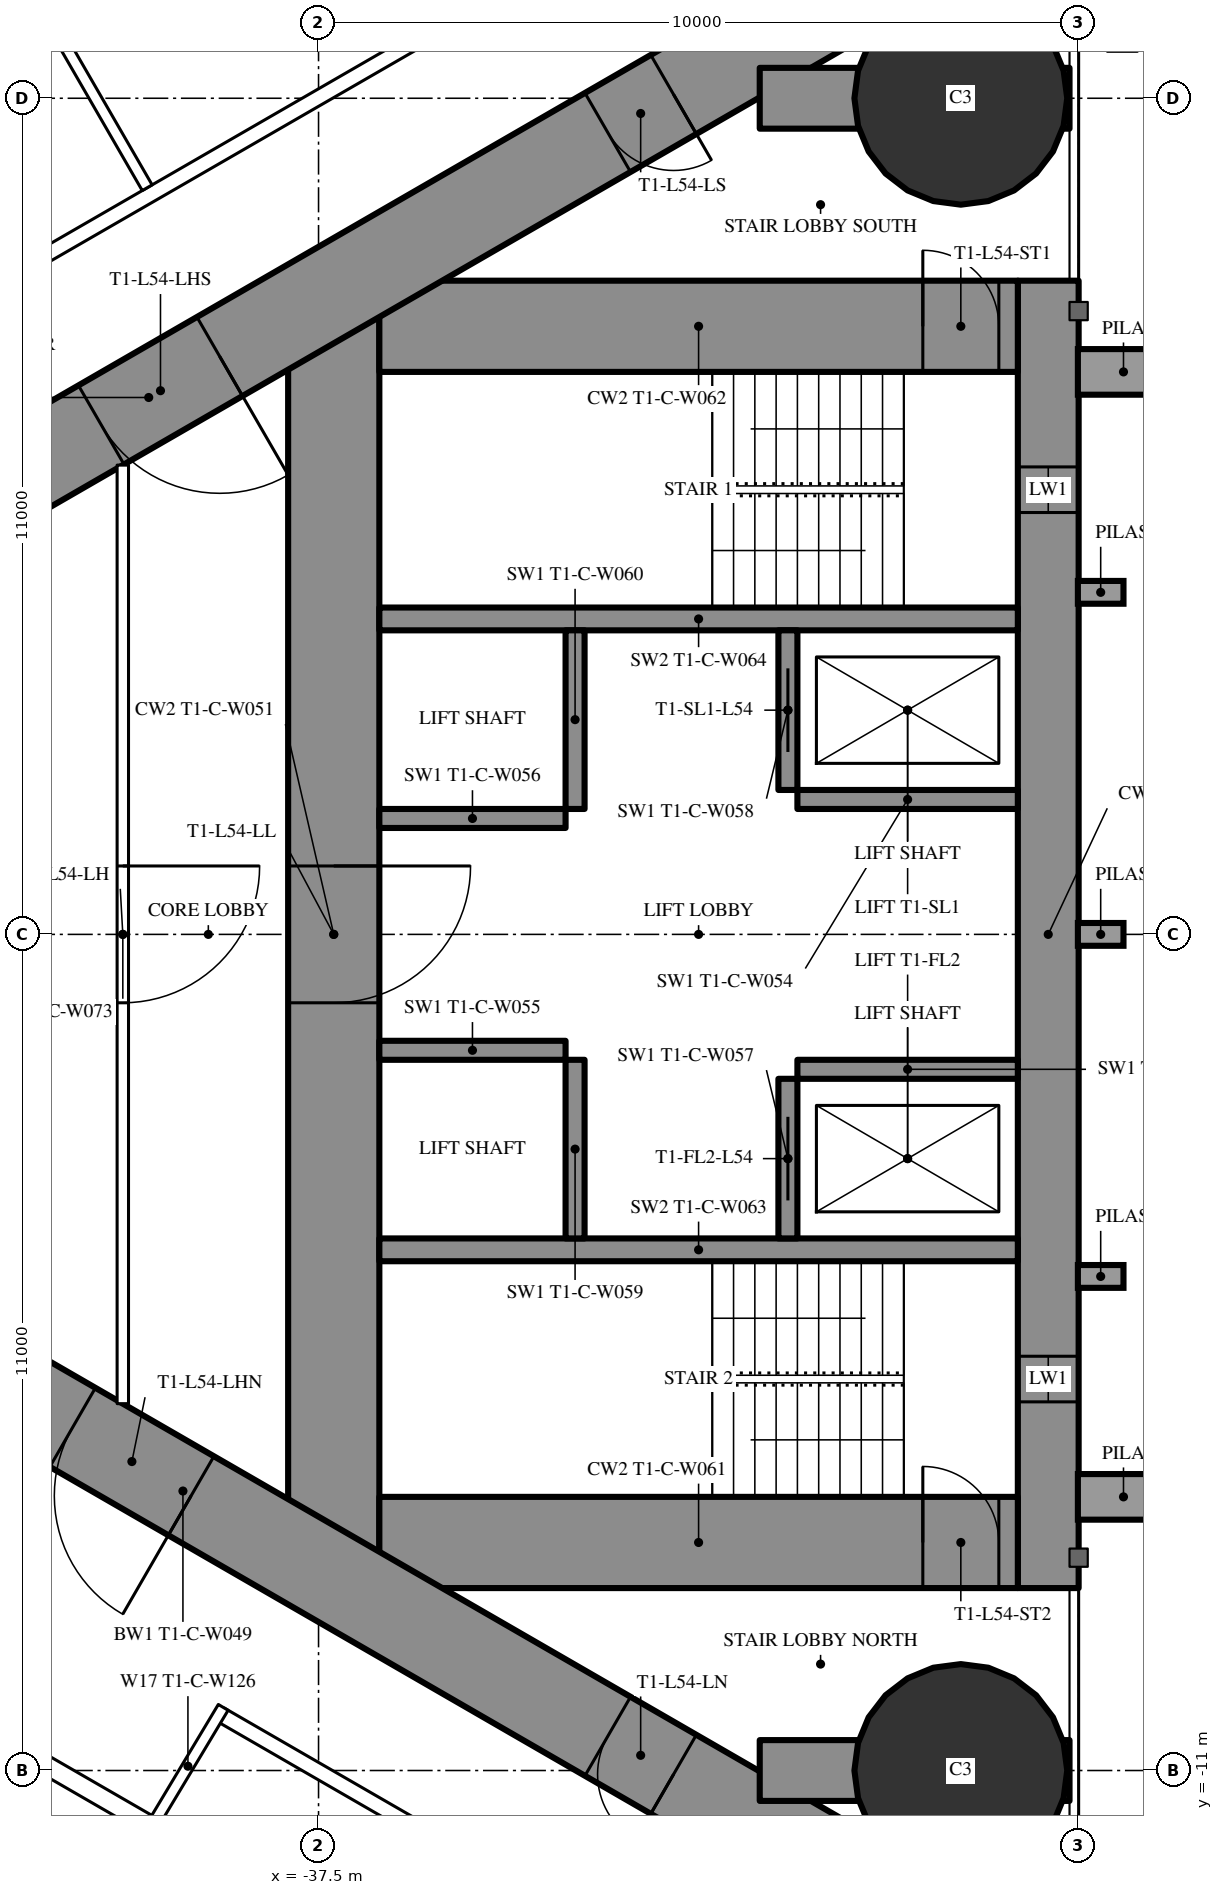
"""IFC4 building model, lengths in metres.
Left out: names, types, materials, properties, quantities, classifications, styles, units other than length and angle.
Written with IfcOpenShell. Run it as: python <this file> out.ifc"""

import sys

from ifc_helpers import new_model, si_unit, direction, frame, frame_2d, origin, origin_2d, place, context, subcontext, project, spatial, rectangle, circle, extrude, element, fill, save


model = new_model("IFC4")
c1 = context("Model", 3, precision=1e-05, world=origin(), true_north=direction((0.0, 1.0)))
c2 = subcontext(c1, "Body", "Model", "MODEL_VIEW")
j1 = project(units=[si_unit("LENGTHUNIT", "METRE"), si_unit("PLANEANGLEUNIT", "RADIAN")], contexts=[c1])
p1 = place(None, origin())
s1 = spatial("IfcSite", under=j1, at=p1, CompositionType="ELEMENT")
p2 = place(p1, origin())
s2 = spatial("IfcBuilding", under=s1, at=p2, CompositionType="ELEMENT")
p3 = place(p2, frame((0.0, 0.0, 201.8)))
s3 = spatial("IfcBuildingStorey", under=s2, at=p3, CompositionType="ELEMENT", Elevation=201.8)
for number, where, z_axis, x_axis in (
    (1, (-29.05, -11.0, 0.0), (0.0, 0.0, 1.0), (1.0, 0.0, 0.0)),
    (2, (-29.05, 11.0, 0.0), (0.0, 0.0, 1.0), (1.0, 0.0, 0.0)),
):
    element("IfcColumn", number, at=place(p3, frame(where, z_axis=z_axis, x_axis=x_axis)), inside=s3, PredefinedType="COLUMN", context=c2, shape_type="SweptSolid", body=[
        extrude(circle(Radius=1.4, at=origin_2d()), origin(), (0.0, 0.0, 1.0), 3.5),
    ])
p4 = place(p3, frame((-27.9, 8.6, 0.0), z_axis=(0.0, 0.0, 1.0), x_axis=(0.0, -1.0, 0.0)))
e3 = element("IfcWall", 3, at=p4, inside=s3, PredefinedType="SHEAR", context=c2, shape_type="SweptSolid", body=[
    extrude(rectangle(XDim=17.2, YDim=0.8, at=frame_2d((8.6, 0.0))), origin(), (0.0, 0.0, 1.0), 3.5),
])
p5 = place(p4, frame((2.45, 0.0, 0.6)))
e4 = element("IfcOpeningElement", 4, at=p5, cuts=e3, PredefinedType="OPENING", context=c2, shape_type="SweptSolid", body=[
    extrude(rectangle(XDim=0.6, YDim=2.1, at=frame_2d((0.3, 1.05))), frame((0.0, 0.41, 0.0), z_axis=(0.0, -1.0, 0.0), x_axis=(1.0, 0.0, 0.0)), (0.0, 0.0, 1.0), 0.82),
])
p6 = place(p4, frame((14.15, 0.0, 0.6)))
e5 = element("IfcOpeningElement", 5, at=p6, cuts=e3, PredefinedType="OPENING", context=c2, shape_type="SweptSolid", body=[
    extrude(rectangle(XDim=0.6, YDim=2.1, at=frame_2d((0.3, 1.05))), frame((0.0, 0.41, 0.0), z_axis=(0.0, -1.0, 0.0), x_axis=(1.0, 0.0, 0.0)), (0.0, 0.0, 1.0), 0.82),
])
p7 = place(p3, frame((-37.3, 8.6, 0.0), z_axis=(0.0, 0.0, 1.0), x_axis=(0.0, -1.0, 0.0)))
e6 = element("IfcWall", 6, at=p7, inside=s3, PredefinedType="SHEAR", context=c2, shape_type="SweptSolid", body=[
    extrude(rectangle(XDim=17.2, YDim=1.2, at=frame_2d((8.6, 0.0))), origin(), (0.0, 0.0, 1.0), 3.5),
])
p8 = place(p7, frame((7.7, 0.0, 0.0)))
e7 = element("IfcOpeningElement", 7, at=p8, cuts=e6, PredefinedType="OPENING", context=c2, shape_type="SweptSolid", body=[
    extrude(rectangle(XDim=1.8, YDim=2.2, at=frame_2d((0.9, 1.1))), frame((0.0, 0.61, 0.0), z_axis=(0.0, -1.0, 0.0), x_axis=(1.0, 0.0, 0.0)), (0.0, 0.0, 1.0), 1.22),
])
p9 = place(p3, frame((-28.3, 8.0, 0.0), z_axis=(0.0, 0.0, 1.0), x_axis=(-1.0, 0.0, 0.0)))
e8 = element("IfcWall", 8, at=p9, inside=s3, PredefinedType="SHEAR", context=c2, shape_type="SweptSolid", body=[
    extrude(rectangle(XDim=8.4, YDim=1.2, at=frame_2d((4.2, 0.0))), origin(), (0.0, 0.0, 1.0), 3.5),
])
p10 = place(p9, frame((0.25, 0.0, 0.0)))
e9 = element("IfcOpeningElement", 9, at=p10, cuts=e8, PredefinedType="OPENING", context=c2, shape_type="SweptSolid", body=[
    extrude(rectangle(XDim=1.0, YDim=2.2, at=frame_2d((0.5, 1.1))), frame((0.0, 0.61, 0.0), z_axis=(0.0, -1.0, 0.0), x_axis=(1.0, 0.0, 0.0)), (0.0, 0.0, 1.0), 1.22),
])
p11 = place(p3, frame((-28.3, -8.0, 0.0), z_axis=(0.0, 0.0, 1.0), x_axis=(-1.0, 0.0, 0.0)))
e10 = element("IfcWall", 10, at=p11, inside=s3, PredefinedType="SHEAR", context=c2, shape_type="SweptSolid", body=[
    extrude(rectangle(XDim=8.4, YDim=1.2, at=frame_2d((4.2, 0.0))), origin(), (0.0, 0.0, 1.0), 3.5),
])
p12 = place(p11, frame((0.25, 0.0, 0.0)))
e11 = element("IfcOpeningElement", 11, at=p12, cuts=e10, PredefinedType="OPENING", context=c2, shape_type="SweptSolid", body=[
    extrude(rectangle(XDim=1.0, YDim=2.2, at=frame_2d((0.5, 1.1))), frame((0.0, 0.61, 0.0), z_axis=(0.0, -1.0, 0.0), x_axis=(1.0, 0.0, 0.0)), (0.0, 0.0, 1.0), 1.22),
])
for number, where, z_axis, x_axis in (
    (12, (-28.3, 4.15, 0.0), (0.0, 0.0, 1.0), (-1.0, 0.0, 0.0)),
    (13, (-28.3, -4.15, 0.0), (0.0, 0.0, 1.0), (-1.0, 0.0, 0.0)),
):
    element("IfcWall", number, at=place(p3, frame(where, z_axis=z_axis, x_axis=x_axis)), inside=s3, PredefinedType="SHEAR", context=c2, shape_type="SweptSolid", body=[
        extrude(rectangle(XDim=8.4, YDim=0.3, at=frame_2d((4.2, 0.0))), origin(), (0.0, 0.0, 1.0), 3.5),
    ])
p13 = place(p3, frame((-31.325, 4.0, 0.0), z_axis=(0.0, 0.0, 1.0), x_axis=(0.0, -1.0, 0.0)))
e14 = element("IfcWall", 14, at=p13, inside=s3, PredefinedType="SHEAR", context=c2, shape_type="SweptSolid", body=[
    extrude(rectangle(XDim=2.1, YDim=0.25, at=frame_2d((1.05, 0.0))), origin(), (0.0, 0.0, 1.0), 3.5),
])
p14 = place(p13, frame((0.5, 0.0, 0.0)))
e15 = element("IfcOpeningElement", 15, at=p14, cuts=e14, PredefinedType="OPENING", context=c2, shape_type="SweptSolid", body=[
    extrude(rectangle(XDim=1.1, YDim=2.2, at=frame_2d((0.55, 1.1))), frame((0.0, 0.135, 0.0), z_axis=(0.0, -1.0, 0.0), x_axis=(1.0, 0.0, 0.0)), (0.0, 0.0, 1.0), 0.27),
])
p15 = place(p3, frame((-34.125, 4.0, 0.0), z_axis=(0.0, 0.0, 1.0), x_axis=(0.0, -1.0, 0.0)))
e16 = element("IfcWall", 16, at=p15, inside=s3, PredefinedType="SHEAR", context=c2, shape_type="SweptSolid", body=[
    extrude(rectangle(XDim=2.35, YDim=0.25, at=frame_2d((1.175, 0.0))), origin(), (0.0, 0.0, 1.0), 3.5),
])
p16 = place(p3, frame((-28.3, 1.775, 0.0), z_axis=(0.0, 0.0, 1.0), x_axis=(-1.0, 0.0, 0.0)))
e17 = element("IfcWall", 17, at=p16, inside=s3, PredefinedType="SHEAR", context=c2, shape_type="SweptSolid", body=[
    extrude(rectangle(XDim=2.9, YDim=0.25, at=frame_2d((1.45, 0.0))), origin(), (0.0, 0.0, 1.0), 3.5),
])
p17 = place(p3, frame((-34.25, 1.525, 0.0), z_axis=(0.0, 0.0, 1.0), x_axis=(-1.0, 0.0, 0.0)))
e18 = element("IfcWall", 18, at=p17, inside=s3, PredefinedType="SHEAR", context=c2, shape_type="SweptSolid", body=[
    extrude(rectangle(XDim=2.45, YDim=0.25, at=frame_2d((1.225, 0.0))), origin(), (0.0, 0.0, 1.0), 3.5),
])
p18 = place(p3, frame((-31.325, -1.9, 0.0), z_axis=(0.0, 0.0, 1.0), x_axis=(0.0, -1.0, 0.0)))
e19 = element("IfcWall", 19, at=p18, inside=s3, PredefinedType="SHEAR", context=c2, shape_type="SweptSolid", body=[
    extrude(rectangle(XDim=2.1, YDim=0.25, at=frame_2d((1.05, 0.0))), origin(), (0.0, 0.0, 1.0), 3.5),
])
p19 = place(p18, frame((0.5, 0.0, 0.0)))
e20 = element("IfcOpeningElement", 20, at=p19, cuts=e19, PredefinedType="OPENING", context=c2, shape_type="SweptSolid", body=[
    extrude(rectangle(XDim=1.1, YDim=2.2, at=frame_2d((0.55, 1.1))), frame((0.0, 0.135, 0.0), z_axis=(0.0, -1.0, 0.0), x_axis=(1.0, 0.0, 0.0)), (0.0, 0.0, 1.0), 0.27),
])
p20 = place(p3, frame((-34.125, -1.65, 0.0), z_axis=(0.0, 0.0, 1.0), x_axis=(0.0, -1.0, 0.0)))
e21 = element("IfcWall", 21, at=p20, inside=s3, PredefinedType="SHEAR", context=c2, shape_type="SweptSolid", body=[
    extrude(rectangle(XDim=2.35, YDim=0.25, at=frame_2d((1.175, 0.0))), origin(), (0.0, 0.0, 1.0), 3.5),
])
p21 = place(p3, frame((-28.3, -1.775, 0.0), z_axis=(0.0, 0.0, 1.0), x_axis=(-1.0, 0.0, 0.0)))
e22 = element("IfcWall", 22, at=p21, inside=s3, PredefinedType="SHEAR", context=c2, shape_type="SweptSolid", body=[
    extrude(rectangle(XDim=2.9, YDim=0.25, at=frame_2d((1.45, 0.0))), origin(), (0.0, 0.0, 1.0), 3.5),
])
p22 = place(p3, frame((-34.25, -1.525, 0.0), z_axis=(0.0, 0.0, 1.0), x_axis=(-1.0, 0.0, 0.0)))
e23 = element("IfcWall", 23, at=p22, inside=s3, PredefinedType="SHEAR", context=c2, shape_type="SweptSolid", body=[
    extrude(rectangle(XDim=2.45, YDim=0.25, at=frame_2d((1.225, 0.0))), origin(), (0.0, 0.0, 1.0), 3.5),
])
p23 = place(p3, frame((-27.2, 14.3, 0.0), z_axis=(0.0, 0.0, 1.0), x_axis=(-0.866026593062, -0.499997940104, 0.0)))
e24 = element("IfcWall", 24, at=p23, inside=s3, PredefinedType="SHEAR", context=c2, shape_type="SweptSolid", body=[
    extrude(rectangle(XDim=28.946, YDim=1.2, at=frame_2d((14.473, 0.0))), origin(), (0.0, 0.0, 1.0), 3.5),
])
p24 = place(p23, frame((6.5, 0.0, 0.0)))
e25 = element("IfcOpeningElement", 25, at=p24, cuts=e24, PredefinedType="OPENING", context=c2, shape_type="SweptSolid", body=[
    extrude(rectangle(XDim=1.0, YDim=2.2, at=frame_2d((0.5, 1.1))), frame((0.0, 0.61, 0.0), z_axis=(0.0, -1.0, 0.0), x_axis=(1.0, 0.0, 0.0)), (0.0, 0.0, 1.0), 1.22),
])
p25 = place(p23, frame((13.395, 0.0, 0.0)))
e26 = element("IfcOpeningElement", 26, at=p25, cuts=e24, PredefinedType="OPENING", context=c2, shape_type="SweptSolid", body=[
    extrude(rectangle(XDim=1.8, YDim=2.03, at=frame_2d((0.9, 1.015))), frame((0.0, 0.61, 0.0), z_axis=(0.0, -1.0, 0.0), x_axis=(1.0, 0.0, 0.0)), (0.0, 0.0, 1.0), 1.22),
])
p26 = place(p3, frame((-27.2, -14.3, 0.0), z_axis=(0.0, 0.0, 1.0), x_axis=(-0.866024021859, 0.500002393557, 0.0)))
e27 = element("IfcWall", 27, at=p26, inside=s3, PredefinedType="SHEAR", context=c2, shape_type="SweptSolid", body=[
    extrude(rectangle(XDim=27.907, YDim=1.2, at=frame_2d((13.954, 0.0))), origin(), (0.0, 0.0, 1.0), 3.5),
])
p27 = place(p26, frame((6.5, 0.0, 0.0)))
e28 = element("IfcOpeningElement", 28, at=p27, cuts=e27, PredefinedType="OPENING", context=c2, shape_type="SweptSolid", body=[
    extrude(rectangle(XDim=1.0, YDim=2.2, at=frame_2d((0.5, 1.1))), frame((0.0, 0.61, 0.0), z_axis=(0.0, -1.0, 0.0), x_axis=(1.0, 0.0, 0.0)), (0.0, 0.0, 1.0), 1.22),
])
p28 = place(p26, frame((13.829, 0.0, 0.0)))
e29 = element("IfcOpeningElement", 29, at=p28, cuts=e27, PredefinedType="OPENING", context=c2, shape_type="SweptSolid", body=[
    extrude(rectangle(XDim=1.8, YDim=2.2, at=frame_2d((0.9, 1.1))), frame((0.0, 0.61, 0.0), z_axis=(0.0, -1.0, 0.0), x_axis=(1.0, 0.0, 0.0)), (0.0, 0.0, 1.0), 1.22),
])
for number, where, z_axis, x_axis in (
    (30, (-27.62, -11.0, 0.0), (0.0, 0.0, 1.0), (-1.0, 0.0, 0.0)),
    (31, (-27.62, 11.0, 0.0), (0.0, 0.0, 1.0), (-1.0, 0.0, 0.0)),
):
    element("IfcWall", number, at=place(p3, frame(where, z_axis=z_axis, x_axis=x_axis)), inside=s3, PredefinedType="SHEAR", context=c2, shape_type="SweptSolid", body=[
        extrude(rectangle(XDim=4.076, YDim=0.8, at=frame_2d((2.038, 0.0))), origin(), (0.0, 0.0, 1.0), 3.5),
    ])
p29 = place(p3, frame((-27.803, 16.608, 0.0), z_axis=(0.0, 0.0, 1.0), x_axis=(-0.866025851808, -0.499999223999, 0.0)))
e32 = element("IfcWall", 32, at=p29, inside=s3, PredefinedType="PARTITIONING", context=c2, shape_type="SweptSolid", body=[
    extrude(rectangle(XDim=33.215, YDim=0.2, at=frame_2d((16.608, 0.0))), origin(), (0.0, 0.0, 1.0), 3.25),
])
p30 = place(p29, frame((5.584, 0.0, 0.0)))
e33 = element("IfcOpeningElement", 33, at=p30, cuts=e32, PredefinedType="OPENING", context=c2, shape_type="SweptSolid", body=[
    extrude(rectangle(XDim=2.0, YDim=2.4, at=frame_2d((1.0, 1.2))), frame((0.0, 0.11, 0.0), z_axis=(0.0, -1.0, 0.0), x_axis=(1.0, 0.0, 0.0)), (0.0, 0.0, 1.0), 0.22),
])
p31 = place(p29, frame((17.04, 0.0, 0.0)))
e34 = element("IfcOpeningElement", 34, at=p31, cuts=e32, PredefinedType="OPENING", context=c2, shape_type="SweptSolid", body=[
    extrude(rectangle(XDim=2.0, YDim=2.4, at=frame_2d((1.0, 1.2))), frame((0.0, 0.11, 0.0), z_axis=(0.0, -1.0, 0.0), x_axis=(1.0, 0.0, 0.0)), (0.0, 0.0, 1.0), 0.22),
])
p32 = place(p29, frame((24.735, 0.0, 0.0)))
e35 = element("IfcOpeningElement", 35, at=p32, cuts=e32, PredefinedType="OPENING", context=c2, shape_type="SweptSolid", body=[
    extrude(rectangle(XDim=2.0, YDim=2.4, at=frame_2d((1.0, 1.2))), frame((0.0, 0.11, 0.0), z_axis=(0.0, -1.0, 0.0), x_axis=(1.0, 0.0, 0.0)), (0.0, 0.0, 1.0), 0.22),
])
p33 = place(p29, frame((30.361, 0.0, 0.0)))
e36 = element("IfcOpeningElement", 36, at=p33, cuts=e32, PredefinedType="OPENING", context=c2, shape_type="SweptSolid", body=[
    extrude(rectangle(XDim=2.0, YDim=2.03, at=frame_2d((1.0, 1.015))), frame((0.0, 0.11, 0.0), z_axis=(0.0, -1.0, 0.0), x_axis=(1.0, 0.0, 0.0)), (0.0, 0.0, 1.0), 0.22),
])
p34 = place(p3, frame((-39.754, 9.823, 0.0), z_axis=(0.0, 0.0, 1.0), x_axis=(-0.499997670926, 0.866026748472, 0.0)))
e37 = element("IfcWall", 37, at=p34, inside=s3, PredefinedType="PARTITIONING", context=c2, shape_type="SweptSolid", body=[
    extrude(rectangle(XDim=6.757, YDim=0.15, at=frame_2d((3.379, 0.0))), origin(), (0.0, 0.0, 1.0), 2.05),
])
p35 = place(p3, frame((-27.803, -16.608, 0.0), z_axis=(0.0, 0.0, 1.0), x_axis=(-0.866028577512, 0.499994502903, 0.0)))
e38 = element("IfcWall", 38, at=p35, inside=s3, PredefinedType="PARTITIONING", context=c2, shape_type="SweptSolid", body=[
    extrude(rectangle(XDim=12.688, YDim=0.2, at=frame_2d((6.344, 0.0))), origin(), (0.0, 0.0, 1.0), 3.25),
])
p36 = place(p35, frame((5.194, 0.0, 0.0)))
e39 = element("IfcOpeningElement", 39, at=p36, cuts=e38, PredefinedType="OPENING", context=c2, shape_type="SweptSolid", body=[
    extrude(rectangle(XDim=2.0, YDim=2.4, at=frame_2d((1.0, 1.2))), frame((0.0, 0.11, 0.0), z_axis=(0.0, -1.0, 0.0), x_axis=(1.0, 0.0, 0.0)), (0.0, 0.0, 1.0), 0.22),
])
p37 = place(p3, frame((-39.683, -11.718, 0.0), z_axis=(0.0, 0.0, 1.0), x_axis=(0.514336634837, 0.857588377991, 0.0)))
e40 = element("IfcWall", 40, at=p37, inside=s3, PredefinedType="PARTITIONING", context=c2, shape_type="SweptSolid", body=[
    extrude(rectangle(XDim=1.805, YDim=0.15, at=frame_2d((0.903, 0.0))), origin(), (0.0, 0.0, 1.0), 3.25),
])
p38 = place(p3, frame((-40.075, 6.174, 0.0), z_axis=(0.0, 0.0, 1.0), x_axis=(0.0, -1.0, 0.0)))
e41 = element("IfcWall", 41, at=p38, inside=s3, PredefinedType="PARTITIONING", context=c2, shape_type="SweptSolid", body=[
    extrude(rectangle(XDim=12.348, YDim=0.15, at=frame_2d((6.174, 0.0))), origin(), (0.0, 0.0, 1.0), 3.25),
])
p39 = place(p38, frame((5.274, 0.0, 0.0)))
e42 = element("IfcOpeningElement", 42, at=p39, cuts=e41, PredefinedType="OPENING", context=c2, shape_type="SweptSolid", body=[
    extrude(rectangle(XDim=1.8, YDim=2.2, at=frame_2d((0.9, 1.1))), frame((0.0, 0.085, 0.0), z_axis=(0.0, -1.0, 0.0), x_axis=(1.0, 0.0, 0.0)), (0.0, 0.0, 1.0), 0.17),
])
p40 = place(p3, frame((-39.758, -11.697, 0.0), z_axis=(0.0, 0.0, 1.0), x_axis=(-0.866024194504, 0.500002094529, 0.0)))
e43 = element("IfcWall", 43, at=p40, inside=s3, PredefinedType="PARTITIONING", context=c2, shape_type="SweptSolid", body=[
    extrude(rectangle(XDim=6.6, YDim=0.25, at=frame_2d((3.3, 0.0))), origin(), (0.0, 0.0, 1.0), 3.25),
])
p41 = place(p39, origin())
e44 = element("IfcDoor", 44, at=p41, inside=s3, OperationType="DOUBLE_DOOR_SINGLE_SWING", PredefinedType="DOOR", context=c2, shape_type="SweptSolid", body=[
    extrude(rectangle(XDim=1.8, YDim=2.2, at=frame_2d((0.9, 1.1))), frame((0.0, 0.025, 0.0), z_axis=(0.0, -1.0, 0.0), x_axis=(1.0, 0.0, 0.0)), (0.0, 0.0, 1.0), 0.05),
])
fill(e42, e44)
p42 = place(p24, origin())
e45 = element("IfcDoor", 45, at=p42, inside=s3, OperationType="SINGLE_SWING_LEFT", PredefinedType="DOOR", context=c2, shape_type="SweptSolid", body=[
    extrude(rectangle(XDim=1.0, YDim=2.2, at=frame_2d((0.5, 1.1))), frame((0.0, 0.025, 0.0), z_axis=(0.0, -1.0, 0.0), x_axis=(1.0, 0.0, 0.0)), (0.0, 0.0, 1.0), 0.05),
])
fill(e25, e45)
p43 = place(p25, origin())
e46 = element("IfcDoor", 46, at=p43, inside=s3, OperationType="DOUBLE_DOOR_SINGLE_SWING", PredefinedType="DOOR", context=c2, shape_type="SweptSolid", body=[
    extrude(rectangle(XDim=1.8, YDim=2.03, at=frame_2d((0.9, 1.015))), frame((0.0, 0.025, 0.0), z_axis=(0.0, -1.0, 0.0), x_axis=(1.0, 0.0, 0.0)), (0.0, 0.0, 1.0), 0.05),
])
fill(e26, e46)
p44 = place(p27, origin())
e47 = element("IfcDoor", 47, at=p44, inside=s3, OperationType="SINGLE_SWING_LEFT", PredefinedType="DOOR", context=c2, shape_type="SweptSolid", body=[
    extrude(rectangle(XDim=1.0, YDim=2.2, at=frame_2d((0.5, 1.1))), frame((0.0, 0.025, 0.0), z_axis=(0.0, -1.0, 0.0), x_axis=(1.0, 0.0, 0.0)), (0.0, 0.0, 1.0), 0.05),
])
fill(e28, e47)
p45 = place(p28, origin())
e48 = element("IfcDoor", 48, at=p45, inside=s3, OperationType="DOUBLE_DOOR_SINGLE_SWING", PredefinedType="DOOR", context=c2, shape_type="SweptSolid", body=[
    extrude(rectangle(XDim=1.8, YDim=2.2, at=frame_2d((0.9, 1.1))), frame((0.0, 0.025, 0.0), z_axis=(0.0, -1.0, 0.0), x_axis=(1.0, 0.0, 0.0)), (0.0, 0.0, 1.0), 0.05),
])
fill(e29, e48)
p46 = place(p8, origin())
e49 = element("IfcDoor", 49, at=p46, inside=s3, OperationType="DOUBLE_DOOR_SINGLE_SWING", PredefinedType="DOOR", context=c2, shape_type="SweptSolid", body=[
    extrude(rectangle(XDim=1.8, YDim=2.2, at=frame_2d((0.9, 1.1))), frame((0.0, 0.025, 0.0), z_axis=(0.0, -1.0, 0.0), x_axis=(1.0, 0.0, 0.0)), (0.0, 0.0, 1.0), 0.05),
])
fill(e7, e49)
p47 = place(p10, origin())
e50 = element("IfcDoor", 50, at=p47, inside=s3, OperationType="SINGLE_SWING_RIGHT", PredefinedType="DOOR", context=c2, shape_type="SweptSolid", body=[
    extrude(rectangle(XDim=1.0, YDim=2.2, at=frame_2d((0.5, 1.1))), frame((0.0, 0.025, 0.0), z_axis=(0.0, -1.0, 0.0), x_axis=(1.0, 0.0, 0.0)), (0.0, 0.0, 1.0), 0.05),
])
fill(e9, e50)
p48 = place(p12, origin())
e51 = element("IfcDoor", 51, at=p48, inside=s3, OperationType="SINGLE_SWING_RIGHT", PredefinedType="DOOR", context=c2, shape_type="SweptSolid", body=[
    extrude(rectangle(XDim=1.0, YDim=2.2, at=frame_2d((0.5, 1.1))), frame((0.0, 0.025, 0.0), z_axis=(0.0, -1.0, 0.0), x_axis=(1.0, 0.0, 0.0)), (0.0, 0.0, 1.0), 0.05),
])
fill(e11, e51)
p49 = place(p14, origin())
e52 = element("IfcDoor", 52, at=p49, inside=s3, OperationType="SLIDING_TO_LEFT", PredefinedType="USERDEFINED", context=c2, shape_type="SweptSolid", body=[
    extrude(rectangle(XDim=1.1, YDim=2.2, at=frame_2d((0.55, 1.1))), frame((0.0, 0.025, 0.0), z_axis=(0.0, -1.0, 0.0), x_axis=(1.0, 0.0, 0.0)), (0.0, 0.0, 1.0), 0.05),
])
fill(e15, e52)
p50 = place(p19, origin())
e53 = element("IfcDoor", 53, at=p50, inside=s3, OperationType="SLIDING_TO_LEFT", PredefinedType="USERDEFINED", context=c2, shape_type="SweptSolid", body=[
    extrude(rectangle(XDim=1.1, YDim=2.2, at=frame_2d((0.55, 1.1))), frame((0.0, 0.025, 0.0), z_axis=(0.0, -1.0, 0.0), x_axis=(1.0, 0.0, 0.0)), (0.0, 0.0, 1.0), 0.05),
])
fill(e20, e53)
p51 = place(p5, origin())
e54 = element("IfcWindow", 54, at=p51, inside=s3, PartitioningType="SINGLE_PANEL", PredefinedType="WINDOW", context=c2, shape_type="SweptSolid", body=[
    extrude(rectangle(XDim=0.6, YDim=2.1, at=frame_2d((0.3, 1.05))), frame((0.0, 0.03, 0.0), z_axis=(0.0, -1.0, 0.0), x_axis=(1.0, 0.0, 0.0)), (0.0, 0.0, 1.0), 0.06),
])
fill(e4, e54)
p52 = place(p6, origin())
e55 = element("IfcWindow", 55, at=p52, inside=s3, PartitioningType="SINGLE_PANEL", PredefinedType="WINDOW", context=c2, shape_type="SweptSolid", body=[
    extrude(rectangle(XDim=0.6, YDim=2.1, at=frame_2d((0.3, 1.05))), frame((0.0, 0.03, 0.0), z_axis=(0.0, -1.0, 0.0), x_axis=(1.0, 0.0, 0.0)), (0.0, 0.0, 1.0), 0.06),
])
fill(e5, e55)
save(model, sys.argv[1])
